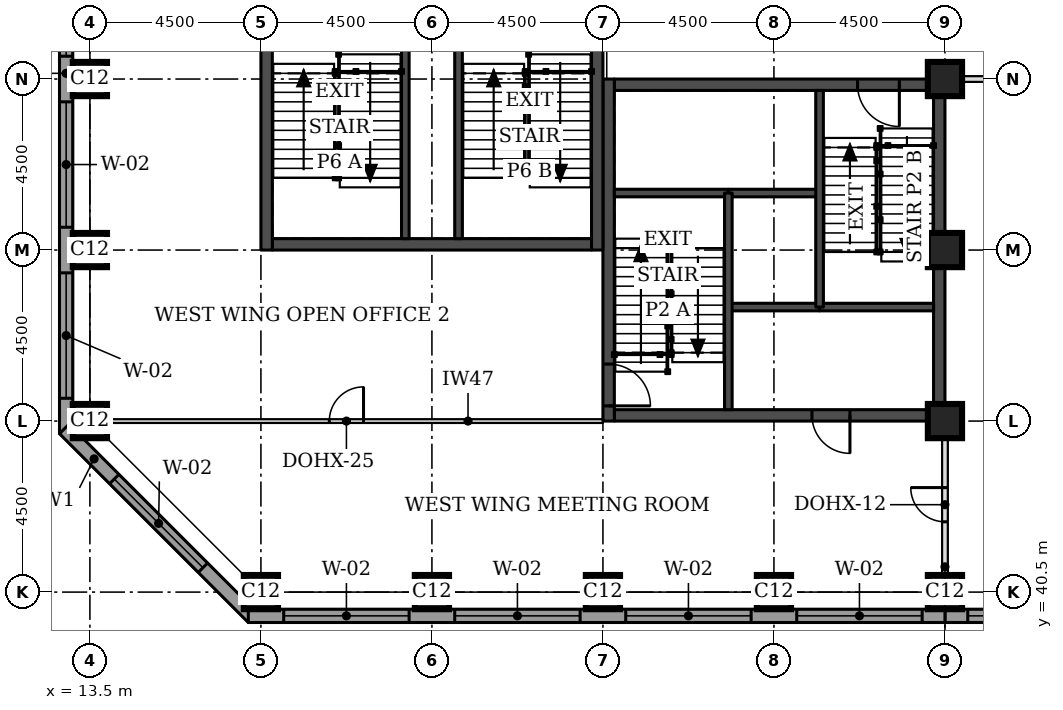
"""IFC4 building model, lengths in metres.
Left out: names, types, materials, properties, quantities, classifications, styles, units other than length and angle.
Written with IfcOpenShell. Run it as: python <this file> out.ifc"""

import sys

from ifc_helpers import new_model, si_unit, direction, frame, frame_2d, origin, origin_2d, place, context, subcontext, project, spatial, rectangle, extrude, element, fill, save


model = new_model("IFC4")
c1 = context("Model", 3, precision=1e-05, world=origin(), true_north=direction((0.0, 1.0)))
c2 = subcontext(c1, "Body", "Model", "MODEL_VIEW")
j1 = project(units=[si_unit("LENGTHUNIT", "METRE"), si_unit("PLANEANGLEUNIT", "RADIAN")], contexts=[c1])
p1 = place(None, origin())
s1 = spatial("IfcSite", under=j1, at=p1, CompositionType="ELEMENT")
p2 = place(p1, origin())
s2 = spatial("IfcBuilding", under=s1, at=p2, CompositionType="ELEMENT")
p3 = place(p2, frame((0.0, 0.0, 256.3)))
s3 = spatial("IfcBuildingStorey", under=s2, at=p3, CompositionType="ELEMENT", Elevation=256.3)
for number, where, z_axis, x_axis in (
    (1, (18.0, 40.5, 0.0), (0.0, 0.0, 1.0), (1.0, 0.0, 0.0)),
    (2, (22.5, 40.5, 0.0), (0.0, 0.0, 1.0), (1.0, 0.0, 0.0)),
    (3, (27.0, 40.5, 0.0), (0.0, 0.0, 1.0), (1.0, 0.0, 0.0)),
    (4, (31.5, 40.5, 0.0), (0.0, 0.0, 1.0), (1.0, 0.0, 0.0)),
    (5, (36.0, 40.5, 0.0), (0.0, 0.0, 1.0), (1.0, 0.0, 0.0)),
    (6, (13.5, 45.0, 0.0), (0.0, 0.0, 1.0), (1.0, 0.0, 0.0)),
    (7, (36.0, 45.0, 0.0), (0.0, 0.0, 1.0), (1.0, 0.0, 0.0)),
    (8, (13.5, 49.5, 0.0), (0.0, 0.0, 1.0), (1.0, 0.0, 0.0)),
    (9, (36.0, 49.5, 0.0), (0.0, 0.0, 1.0), (1.0, 0.0, 0.0)),
    (10, (13.5, 54.0, 0.0), (0.0, 0.0, 1.0), (1.0, 0.0, 0.0)),
    (11, (36.0, 54.0, 0.0), (0.0, 0.0, 1.0), (1.0, 0.0, 0.0)),
):
    element("IfcColumn", number, at=place(p3, frame(where, z_axis=z_axis, x_axis=x_axis)), inside=s3, PredefinedType="COLUMN", context=c2, shape_type="SweptSolid", body=[
        extrude(rectangle(XDim=0.9, YDim=0.9, at=origin_2d()), origin(), (0.0, 0.0, 1.0), 3.7),
    ])
p4 = place(p3, frame((27.3, 45.15, 0.0), z_axis=(0.0, 0.0, 1.0), x_axis=(1.0, 0.0, 0.0)))
e12 = element("IfcWall", 12, at=p4, inside=s3, PredefinedType="SHEAR", context=c2, shape_type="SweptSolid", body=[
    extrude(rectangle(XDim=8.4, YDim=0.3, at=frame_2d((4.2, 0.0))), origin(), (0.0, 0.0, 1.0), 3.7),
])
p5 = place(p4, frame((5.2, 0.0, 0.0)))
e13 = element("IfcOpeningElement", 13, at=p5, cuts=e12, PredefinedType="OPENING", context=c2, shape_type="SweptSolid", body=[
    extrude(rectangle(XDim=1.0, YDim=2.1, at=frame_2d((0.5, 1.05))), frame((0.0, 0.16, 0.0), z_axis=(0.0, -1.0, 0.0), x_axis=(1.0, 0.0, 0.0)), (0.0, 0.0, 1.0), 0.32),
])
p6 = place(p3, frame((27.3, 53.85, 0.0), z_axis=(0.0, 0.0, 1.0), x_axis=(1.0, 0.0, 0.0)))
e14 = element("IfcWall", 14, at=p6, inside=s3, PredefinedType="SHEAR", context=c2, shape_type="SweptSolid", body=[
    extrude(rectangle(XDim=8.4, YDim=0.3, at=frame_2d((4.2, 0.0))), origin(), (0.0, 0.0, 1.0), 3.7),
])
p7 = place(p6, frame((6.4, 0.0, 0.0)))
e15 = element("IfcOpeningElement", 15, at=p7, cuts=e14, PredefinedType="OPENING", context=c2, shape_type="SweptSolid", body=[
    extrude(rectangle(XDim=1.1, YDim=2.1, at=frame_2d((0.55, 1.05))), frame((0.0, 0.16, 0.0), z_axis=(0.0, -1.0, 0.0), x_axis=(1.0, 0.0, 0.0)), (0.0, 0.0, 1.0), 0.32),
])
p8 = place(p3, frame((27.15, 45.0, 0.0), z_axis=(0.0, 0.0, 1.0), x_axis=(0.0, 1.0, 0.0)))
e16 = element("IfcWall", 16, at=p8, inside=s3, PredefinedType="SHEAR", context=c2, shape_type="SweptSolid", body=[
    extrude(rectangle(XDim=9.0, YDim=0.3, at=frame_2d((4.5, 0.0))), origin(), (0.0, 0.0, 1.0), 3.7),
])
p9 = place(p8, frame((0.4, 0.0, 0.0)))
e17 = element("IfcOpeningElement", 17, at=p9, cuts=e16, PredefinedType="OPENING", context=c2, shape_type="SweptSolid", body=[
    extrude(rectangle(XDim=1.1, YDim=2.1, at=frame_2d((0.55, 1.05))), frame((0.0, 0.16, 0.0), z_axis=(0.0, -1.0, 0.0), x_axis=(1.0, 0.0, 0.0)), (0.0, 0.0, 1.0), 0.32),
])
p10 = place(p3, frame((35.85, 45.0, 0.0), z_axis=(0.0, 0.0, 1.0), x_axis=(0.0, 1.0, 0.0)))
e18 = element("IfcWall", 18, at=p10, inside=s3, PredefinedType="SHEAR", context=c2, shape_type="SweptSolid", body=[
    extrude(rectangle(XDim=9.0, YDim=0.3, at=frame_2d((4.5, 0.0))), origin(), (0.0, 0.0, 1.0), 3.7),
])
p11 = place(p3, frame((18.3, 49.65, 0.0), z_axis=(0.0, 0.0, 1.0), x_axis=(1.0, 0.0, 0.0)))
e19 = element("IfcWall", 19, at=p11, inside=s3, PredefinedType="SHEAR", context=c2, shape_type="SweptSolid", body=[
    extrude(rectangle(XDim=8.4, YDim=0.3, at=frame_2d((4.2, 0.0))), origin(), (0.0, 0.0, 1.0), 3.7),
])
p12 = place(p3, frame((18.15, 49.5, 0.0), z_axis=(0.0, 0.0, 1.0), x_axis=(0.0, 1.0, 0.0)))
e20 = element("IfcWall", 20, at=p12, inside=s3, PredefinedType="SHEAR", context=c2, shape_type="SweptSolid", body=[
    extrude(rectangle(XDim=9.0, YDim=0.3, at=frame_2d((4.5, 0.0))), origin(), (0.0, 0.0, 1.0), 3.7),
])
p13 = place(p3, frame((26.85, 49.5, 0.0), z_axis=(0.0, 0.0, 1.0), x_axis=(0.0, 1.0, 0.0)))
e21 = element("IfcWall", 21, at=p13, inside=s3, PredefinedType="SHEAR", context=c2, shape_type="SweptSolid", body=[
    extrude(rectangle(XDim=9.0, YDim=0.3, at=frame_2d((4.5, 0.0))), origin(), (0.0, 0.0, 1.0), 3.7),
])
p14 = place(p13, frame((6.6, 0.0, 0.0)))
e22 = element("IfcOpeningElement", 22, at=p14, cuts=e21, PredefinedType="OPENING", context=c2, shape_type="SweptSolid", body=[
    extrude(rectangle(XDim=1.8, YDim=2.1, at=frame_2d((0.9, 1.05))), frame((0.0, 0.16, 0.0), z_axis=(0.0, -1.0, 0.0), x_axis=(1.0, 0.0, 0.0)), (0.0, 0.0, 1.0), 0.32),
])
p15 = place(p3, frame((36.0, 39.875, 0.0), z_axis=(0.0, 0.0, 1.0), x_axis=(1.0, 0.0, 0.0)))
e23 = element("IfcWall", 23, at=p15, inside=s3, PredefinedType="STANDARD", context=c2, shape_type="SweptSolid", body=[
    extrude(rectangle(XDim=36.331, YDim=0.35, at=frame_2d((18.166, 0.0))), origin(), (0.0, 0.0, 1.0), 3.525),
])
p16 = place(p15, frame((0.6, 0.0, 0.9)))
e24 = element("IfcOpeningElement", 24, at=p16, cuts=e23, PredefinedType="OPENING", context=c2, shape_type="SweptSolid", body=[
    extrude(rectangle(XDim=3.3, YDim=1.9, at=frame_2d((1.65, 0.95))), frame((0.0, 0.185, 0.0), z_axis=(0.0, -1.0, 0.0), x_axis=(1.0, 0.0, 0.0)), (0.0, 0.0, 1.0), 0.37),
])
p17 = place(p15, frame((5.1, 0.0, 0.9)))
e25 = element("IfcOpeningElement", 25, at=p17, cuts=e23, PredefinedType="OPENING", context=c2, shape_type="SweptSolid", body=[
    extrude(rectangle(XDim=3.3, YDim=1.9, at=frame_2d((1.65, 0.95))), frame((0.0, 0.185, 0.0), z_axis=(0.0, -1.0, 0.0), x_axis=(1.0, 0.0, 0.0)), (0.0, 0.0, 1.0), 0.37),
])
p18 = place(p15, frame((9.6, 0.0, 0.9)))
e26 = element("IfcOpeningElement", 26, at=p18, cuts=e23, PredefinedType="OPENING", context=c2, shape_type="SweptSolid", body=[
    extrude(rectangle(XDim=3.3, YDim=1.9, at=frame_2d((1.65, 0.95))), frame((0.0, 0.185, 0.0), z_axis=(0.0, -1.0, 0.0), x_axis=(1.0, 0.0, 0.0)), (0.0, 0.0, 1.0), 0.37),
])
p19 = place(p15, frame((14.1, 0.0, 0.9)))
e27 = element("IfcOpeningElement", 27, at=p19, cuts=e23, PredefinedType="OPENING", context=c2, shape_type="SweptSolid", body=[
    extrude(rectangle(XDim=3.3, YDim=1.9, at=frame_2d((1.65, 0.95))), frame((0.0, 0.185, 0.0), z_axis=(0.0, -1.0, 0.0), x_axis=(1.0, 0.0, 0.0)), (0.0, 0.0, 1.0), 0.37),
])
p20 = place(p15, frame((18.6, 0.0, 0.9)))
e28 = element("IfcOpeningElement", 28, at=p20, cuts=e23, PredefinedType="OPENING", context=c2, shape_type="SweptSolid", body=[
    extrude(rectangle(XDim=3.3, YDim=1.9, at=frame_2d((1.65, 0.95))), frame((0.0, 0.185, 0.0), z_axis=(0.0, -1.0, 0.0), x_axis=(1.0, 0.0, 0.0)), (0.0, 0.0, 1.0), 0.37),
])
p21 = place(p15, frame((23.1, 0.0, 0.9)))
e29 = element("IfcOpeningElement", 29, at=p21, cuts=e23, PredefinedType="OPENING", context=c2, shape_type="SweptSolid", body=[
    extrude(rectangle(XDim=3.3, YDim=1.9, at=frame_2d((1.65, 0.95))), frame((0.0, 0.185, 0.0), z_axis=(0.0, -1.0, 0.0), x_axis=(1.0, 0.0, 0.0)), (0.0, 0.0, 1.0), 0.37),
])
p22 = place(p15, frame((27.6, 0.0, 0.9)))
e30 = element("IfcOpeningElement", 30, at=p22, cuts=e23, PredefinedType="OPENING", context=c2, shape_type="SweptSolid", body=[
    extrude(rectangle(XDim=3.3, YDim=1.9, at=frame_2d((1.65, 0.95))), frame((0.0, 0.185, 0.0), z_axis=(0.0, -1.0, 0.0), x_axis=(1.0, 0.0, 0.0)), (0.0, 0.0, 1.0), 0.37),
])
p23 = place(p15, frame((32.1, 0.0, 0.9)))
e31 = element("IfcOpeningElement", 31, at=p23, cuts=e23, PredefinedType="OPENING", context=c2, shape_type="SweptSolid", body=[
    extrude(rectangle(XDim=3.3, YDim=1.9, at=frame_2d((1.65, 0.95))), frame((0.0, 0.185, 0.0), z_axis=(0.0, -1.0, 0.0), x_axis=(1.0, 0.0, 0.0)), (0.0, 0.0, 1.0), 0.37),
])
p24 = place(p3, frame((12.875, 58.831, 0.0), z_axis=(0.0, 0.0, 1.0), x_axis=(0.0, -1.0, 0.0)))
e32 = element("IfcWall", 32, at=p24, inside=s3, PredefinedType="STANDARD", context=c2, shape_type="SweptSolid", body=[
    extrude(rectangle(XDim=14.163, YDim=0.35, at=frame_2d((7.081, 0.0))), origin(), (0.0, 0.0, 1.0), 3.525),
])
p25 = place(p24, frame((0.931, 0.0, 0.9)))
e33 = element("IfcOpeningElement", 33, at=p25, cuts=e32, PredefinedType="OPENING", context=c2, shape_type="SweptSolid", body=[
    extrude(rectangle(XDim=3.3, YDim=1.9, at=frame_2d((1.65, 0.95))), frame((0.0, 0.185, 0.0), z_axis=(0.0, -1.0, 0.0), x_axis=(1.0, 0.0, 0.0)), (0.0, 0.0, 1.0), 0.37),
])
p26 = place(p24, frame((5.431, 0.0, 0.9)))
e34 = element("IfcOpeningElement", 34, at=p26, cuts=e32, PredefinedType="OPENING", context=c2, shape_type="SweptSolid", body=[
    extrude(rectangle(XDim=3.3, YDim=1.9, at=frame_2d((1.65, 0.95))), frame((0.0, 0.185, 0.0), z_axis=(0.0, -1.0, 0.0), x_axis=(1.0, 0.0, 0.0)), (0.0, 0.0, 1.0), 0.37),
])
p27 = place(p24, frame((9.931, 0.0, 0.9)))
e35 = element("IfcOpeningElement", 35, at=p27, cuts=e32, PredefinedType="OPENING", context=c2, shape_type="SweptSolid", body=[
    extrude(rectangle(XDim=3.3, YDim=1.9, at=frame_2d((1.65, 0.95))), frame((0.0, 0.185, 0.0), z_axis=(0.0, -1.0, 0.0), x_axis=(1.0, 0.0, 0.0)), (0.0, 0.0, 1.0), 0.37),
])
p28 = place(p3, frame((12.824, 44.792, 0.0), z_axis=(0.0, 0.0, 1.0), x_axis=(0.707106781187, -0.707106781187, 0.0)))
e36 = element("IfcWall", 36, at=p28, inside=s3, PredefinedType="STANDARD", context=c2, shape_type="SweptSolid", body=[
    extrude(rectangle(XDim=7.027, YDim=0.35, at=frame_2d((3.513, 0.0))), origin(), (0.0, 0.0, 1.0), 3.525),
])
p29 = place(p28, frame((1.863, 0.0, 0.9)))
e37 = element("IfcOpeningElement", 37, at=p29, cuts=e36, PredefinedType="OPENING", context=c2, shape_type="SweptSolid", body=[
    extrude(rectangle(XDim=3.3, YDim=1.9, at=frame_2d((1.65, 0.95))), frame((0.0, 0.185, 0.0), z_axis=(0.0, -1.0, 0.0), x_axis=(1.0, 0.0, 0.0)), (0.0, 0.0, 1.0), 0.37),
])
p30 = place(p3, frame((17.669, 39.875, 0.0), z_axis=(0.0, 0.0, 1.0), x_axis=(1.0, 0.0, 0.0)))
e38 = element("IfcWall", 38, at=p30, inside=s3, PredefinedType="STANDARD", context=c2, shape_type="SweptSolid", body=[
    extrude(rectangle(XDim=18.331, YDim=0.35, at=frame_2d((9.166, 0.0))), origin(), (0.0, 0.0, 1.0), 3.525),
])
p31 = place(p30, frame((0.931, 0.0, 0.9)))
e39 = element("IfcOpeningElement", 39, at=p31, cuts=e38, PredefinedType="OPENING", context=c2, shape_type="SweptSolid", body=[
    extrude(rectangle(XDim=3.3, YDim=1.9, at=frame_2d((1.65, 0.95))), frame((0.0, 0.185, 0.0), z_axis=(0.0, -1.0, 0.0), x_axis=(1.0, 0.0, 0.0)), (0.0, 0.0, 1.0), 0.37),
])
p32 = place(p30, frame((5.431, 0.0, 0.9)))
e40 = element("IfcOpeningElement", 40, at=p32, cuts=e38, PredefinedType="OPENING", context=c2, shape_type="SweptSolid", body=[
    extrude(rectangle(XDim=3.3, YDim=1.9, at=frame_2d((1.65, 0.95))), frame((0.0, 0.185, 0.0), z_axis=(0.0, -1.0, 0.0), x_axis=(1.0, 0.0, 0.0)), (0.0, 0.0, 1.0), 0.37),
])
p33 = place(p30, frame((9.931, 0.0, 0.9)))
e41 = element("IfcOpeningElement", 41, at=p33, cuts=e38, PredefinedType="OPENING", context=c2, shape_type="SweptSolid", body=[
    extrude(rectangle(XDim=3.3, YDim=1.9, at=frame_2d((1.65, 0.95))), frame((0.0, 0.185, 0.0), z_axis=(0.0, -1.0, 0.0), x_axis=(1.0, 0.0, 0.0)), (0.0, 0.0, 1.0), 0.37),
])
p34 = place(p30, frame((14.431, 0.0, 0.9)))
e42 = element("IfcOpeningElement", 42, at=p34, cuts=e38, PredefinedType="OPENING", context=c2, shape_type="SweptSolid", body=[
    extrude(rectangle(XDim=3.3, YDim=1.9, at=frame_2d((1.65, 0.95))), frame((0.0, 0.185, 0.0), z_axis=(0.0, -1.0, 0.0), x_axis=(1.0, 0.0, 0.0)), (0.0, 0.0, 1.0), 0.37),
])
p35 = place(p3, frame((36.45, 54.0, 0.0), z_axis=(0.0, 0.0, 1.0), x_axis=(1.0, 0.0, 0.0)))
e43 = element("IfcWall", 43, at=p35, inside=s3, PredefinedType="PARTITIONING", context=c2, shape_type="SweptSolid", body=[
    extrude(rectangle(XDim=5.625, YDim=0.15, at=frame_2d((2.812, 0.0))), origin(), (0.0, 0.0, 1.0), 3.55),
])
p36 = place(p3, frame((36.0, 40.95, 0.0), z_axis=(0.0, 0.0, 1.0), x_axis=(0.0, 1.0, 0.0)))
e44 = element("IfcWall", 44, at=p36, inside=s3, PredefinedType="PARTITIONING", context=c2, shape_type="SweptSolid", body=[
    extrude(rectangle(XDim=3.63, YDim=0.15, at=frame_2d((1.815, 0.0))), origin(), (0.0, 0.0, 1.0), 2.8),
])
p37 = place(p36, frame((1.4, 0.0, 0.0)))
e45 = element("IfcOpeningElement", 45, at=p37, cuts=e44, PredefinedType="OPENING", context=c2, shape_type="SweptSolid", body=[
    extrude(rectangle(XDim=0.9, YDim=2.1, at=frame_2d((0.45, 1.05))), frame((0.0, 0.085, 0.0), z_axis=(0.0, -1.0, 0.0), x_axis=(1.0, 0.0, 0.0)), (0.0, 0.0, 1.0), 0.17),
])
p38 = place(p3, frame((13.5, 45.0, 0.0), z_axis=(0.0, 0.0, 1.0), x_axis=(1.0, 0.0, 0.0)))
e46 = element("IfcWall", 46, at=p38, inside=s3, PredefinedType="PARTITIONING", context=c2, shape_type="SweptSolid", body=[
    extrude(rectangle(XDim=13.5, YDim=0.1, at=frame_2d((6.75, 0.0))), origin(), (0.0, 0.0, 1.0), 2.55),
])
p39 = place(p38, frame((6.3, 0.0, 0.0)))
e47 = element("IfcOpeningElement", 47, at=p39, cuts=e46, PredefinedType="OPENING", context=c2, shape_type="SweptSolid", body=[
    extrude(rectangle(XDim=0.9, YDim=2.1, at=frame_2d((0.45, 1.05))), frame((0.0, 0.06, 0.0), z_axis=(0.0, -1.0, 0.0), x_axis=(1.0, 0.0, 0.0)), (0.0, 0.0, 1.0), 0.12),
])
p40 = place(p3, frame((30.3, 48.0, 0.0), z_axis=(0.0, 0.0, 1.0), x_axis=(1.0, 0.0, 0.0)))
e48 = element("IfcWall", 48, at=p40, inside=s3, PredefinedType="SOLIDWALL", context=c2, shape_type="SweptSolid", body=[
    extrude(rectangle(XDim=2.4, YDim=0.2, at=frame_2d((1.2, 0.0))), origin(), (0.0, 0.0, 1.0), 3.55),
])
p41 = place(p3, frame((32.7, 48.0, 0.0), z_axis=(0.0, 0.0, 1.0), x_axis=(1.0, 0.0, 0.0)))
e49 = element("IfcWall", 49, at=p41, inside=s3, PredefinedType="SOLIDWALL", context=c2, shape_type="SweptSolid", body=[
    extrude(rectangle(XDim=3.0, YDim=0.2, at=frame_2d((1.5, 0.0))), origin(), (0.0, 0.0, 1.0), 3.55),
])
p42 = place(p3, frame((30.3, 51.0, 0.0), z_axis=(0.0, 0.0, 1.0), x_axis=(1.0, 0.0, 0.0)))
e50 = element("IfcWall", 50, at=p42, inside=s3, PredefinedType="SOLIDWALL", context=c2, shape_type="SweptSolid", body=[
    extrude(rectangle(XDim=2.4, YDim=0.2, at=frame_2d((1.2, 0.0))), origin(), (0.0, 0.0, 1.0), 3.7),
])
p43 = place(p3, frame((27.3, 51.0, 0.0), z_axis=(0.0, 0.0, 1.0), x_axis=(1.0, 0.0, 0.0)))
e51 = element("IfcWall", 51, at=p43, inside=s3, PredefinedType="SOLIDWALL", context=c2, shape_type="SweptSolid", body=[
    extrude(rectangle(XDim=3.0, YDim=0.2, at=frame_2d((1.5, 0.0))), origin(), (0.0, 0.0, 1.0), 3.55),
])
for number, where, z_axis, x_axis in (
    (52, (30.3, 45.3, 0.0), (0.0, 0.0, 1.0), (0.0, 1.0, 0.0)),
    (53, (32.7, 48.0, 0.0), (0.0, 0.0, 1.0), (0.0, 1.0, 0.0)),
):
    element("IfcWall", number, at=place(p3, frame(where, z_axis=z_axis, x_axis=x_axis)), inside=s3, PredefinedType="SOLIDWALL", context=c2, shape_type="SweptSolid", body=[
        extrude(rectangle(XDim=5.7, YDim=0.2, at=frame_2d((2.85, 0.0))), origin(), (0.0, 0.0, 1.0), 3.55),
    ])
for number, where, z_axis, x_axis in (
    (54, (21.8, 49.8, 0.0), (0.0, 0.0, 1.0), (0.0, 1.0, 0.0)),
    (55, (23.2, 49.8, 0.0), (0.0, 0.0, 1.0), (0.0, 1.0, 0.0)),
):
    element("IfcWall", number, at=place(p3, frame(where, z_axis=z_axis, x_axis=x_axis)), inside=s3, PredefinedType="SOLIDWALL", context=c2, shape_type="SweptSolid", body=[
        extrude(rectangle(XDim=6.05, YDim=0.2, at=frame_2d((3.025, 0.0))), origin(), (0.0, 0.0, 1.0), 3.55),
    ])
p44 = place(p16, origin())
e56 = element("IfcWindow", 56, at=p44, inside=s3, PartitioningType="SINGLE_PANEL", PredefinedType="WINDOW", context=c2, shape_type="SweptSolid", body=[
    extrude(rectangle(XDim=3.3, YDim=1.9, at=frame_2d((1.65, 0.95))), frame((0.0, 0.085, 0.0), z_axis=(0.0, -1.0, 0.0), x_axis=(1.0, 0.0, 0.0)), (0.0, 0.0, 1.0), 0.06),
])
fill(e24, e56)
p45 = place(p25, origin())
e57 = element("IfcWindow", 57, at=p45, inside=s3, PartitioningType="SINGLE_PANEL", PredefinedType="WINDOW", context=c2, shape_type="SweptSolid", body=[
    extrude(rectangle(XDim=3.3, YDim=1.9, at=frame_2d((1.65, 0.95))), frame((0.0, 0.085, 0.0), z_axis=(0.0, -1.0, 0.0), x_axis=(1.0, 0.0, 0.0)), (0.0, 0.0, 1.0), 0.06),
])
fill(e33, e57)
p46 = place(p26, origin())
e58 = element("IfcWindow", 58, at=p46, inside=s3, PartitioningType="SINGLE_PANEL", PredefinedType="WINDOW", context=c2, shape_type="SweptSolid", body=[
    extrude(rectangle(XDim=3.3, YDim=1.9, at=frame_2d((1.65, 0.95))), frame((0.0, 0.085, 0.0), z_axis=(0.0, -1.0, 0.0), x_axis=(1.0, 0.0, 0.0)), (0.0, 0.0, 1.0), 0.06),
])
fill(e34, e58)
p47 = place(p27, origin())
e59 = element("IfcWindow", 59, at=p47, inside=s3, PartitioningType="SINGLE_PANEL", PredefinedType="WINDOW", context=c2, shape_type="SweptSolid", body=[
    extrude(rectangle(XDim=3.3, YDim=1.9, at=frame_2d((1.65, 0.95))), frame((0.0, 0.085, 0.0), z_axis=(0.0, -1.0, 0.0), x_axis=(1.0, 0.0, 0.0)), (0.0, 0.0, 1.0), 0.06),
])
fill(e35, e59)
p48 = place(p29, origin())
e60 = element("IfcWindow", 60, at=p48, inside=s3, PartitioningType="SINGLE_PANEL", PredefinedType="WINDOW", context=c2, shape_type="SweptSolid", body=[
    extrude(rectangle(XDim=3.3, YDim=1.9, at=frame_2d((1.65, 0.95))), frame((0.0, 0.085, 0.0), z_axis=(0.0, -1.0, 0.0), x_axis=(1.0, 0.0, 0.0)), (0.0, 0.0, 1.0), 0.06),
])
fill(e37, e60)
p49 = place(p31, origin())
e61 = element("IfcWindow", 61, at=p49, inside=s3, PartitioningType="SINGLE_PANEL", PredefinedType="WINDOW", context=c2, shape_type="SweptSolid", body=[
    extrude(rectangle(XDim=3.3, YDim=1.9, at=frame_2d((1.65, 0.95))), frame((0.0, 0.085, 0.0), z_axis=(0.0, -1.0, 0.0), x_axis=(1.0, 0.0, 0.0)), (0.0, 0.0, 1.0), 0.06),
])
fill(e39, e61)
p50 = place(p32, origin())
e62 = element("IfcWindow", 62, at=p50, inside=s3, PartitioningType="SINGLE_PANEL", PredefinedType="WINDOW", context=c2, shape_type="SweptSolid", body=[
    extrude(rectangle(XDim=3.3, YDim=1.9, at=frame_2d((1.65, 0.95))), frame((0.0, 0.085, 0.0), z_axis=(0.0, -1.0, 0.0), x_axis=(1.0, 0.0, 0.0)), (0.0, 0.0, 1.0), 0.06),
])
fill(e40, e62)
p51 = place(p33, origin())
e63 = element("IfcWindow", 63, at=p51, inside=s3, PartitioningType="SINGLE_PANEL", PredefinedType="WINDOW", context=c2, shape_type="SweptSolid", body=[
    extrude(rectangle(XDim=3.3, YDim=1.9, at=frame_2d((1.65, 0.95))), frame((0.0, 0.085, 0.0), z_axis=(0.0, -1.0, 0.0), x_axis=(1.0, 0.0, 0.0)), (0.0, 0.0, 1.0), 0.06),
])
fill(e41, e63)
p52 = place(p34, origin())
e64 = element("IfcWindow", 64, at=p52, inside=s3, PartitioningType="SINGLE_PANEL", PredefinedType="WINDOW", context=c2, shape_type="SweptSolid", body=[
    extrude(rectangle(XDim=3.3, YDim=1.9, at=frame_2d((1.65, 0.95))), frame((0.0, 0.085, 0.0), z_axis=(0.0, -1.0, 0.0), x_axis=(1.0, 0.0, 0.0)), (0.0, 0.0, 1.0), 0.06),
])
fill(e42, e64)
p53 = place(p37, origin())
e65 = element("IfcDoor", 65, at=p53, inside=s3, OperationType="SINGLE_SWING_RIGHT", PredefinedType="DOOR", context=c2, shape_type="SweptSolid", body=[
    extrude(rectangle(XDim=0.9, YDim=2.1, at=frame_2d((0.45, 1.05))), frame((0.0, 0.025, 0.0), z_axis=(0.0, -1.0, 0.0), x_axis=(1.0, 0.0, 0.0)), (0.0, 0.0, 1.0), 0.05),
])
fill(e45, e65)
p54 = place(p39, origin())
e66 = element("IfcDoor", 66, at=p54, inside=s3, OperationType="SINGLE_SWING_RIGHT", PredefinedType="DOOR", context=c2, shape_type="SweptSolid", body=[
    extrude(rectangle(XDim=0.9, YDim=2.1, at=frame_2d((0.45, 1.05))), frame((0.0, 0.025, 0.0), z_axis=(0.0, -1.0, 0.0), x_axis=(1.0, 0.0, 0.0)), (0.0, 0.0, 1.0), 0.05),
])
fill(e47, e66)
p55 = place(p9, frame((1.1, 0.0, 0.0), z_axis=(0.0, 0.0, 1.0), x_axis=(-1.0, 0.0, 0.0)))
e67 = element("IfcDoor", 67, at=p55, inside=s3, OperationType="SINGLE_SWING_RIGHT", PredefinedType="DOOR", context=c2, shape_type="SweptSolid", body=[
    extrude(rectangle(XDim=1.1, YDim=2.1, at=frame_2d((0.55, 1.05))), frame((0.0, 0.025, 0.0), z_axis=(0.0, -1.0, 0.0), x_axis=(1.0, 0.0, 0.0)), (0.0, 0.0, 1.0), 0.05),
])
fill(e17, e67)
p56 = place(p7, frame((1.1, 0.0, 0.0), z_axis=(0.0, 0.0, 1.0), x_axis=(-1.0, 0.0, 0.0)))
e68 = element("IfcDoor", 68, at=p56, inside=s3, OperationType="SINGLE_SWING_LEFT", PredefinedType="DOOR", context=c2, shape_type="SweptSolid", body=[
    extrude(rectangle(XDim=1.1, YDim=2.1, at=frame_2d((0.55, 1.05))), frame((0.0, 0.025, 0.0), z_axis=(0.0, -1.0, 0.0), x_axis=(1.0, 0.0, 0.0)), (0.0, 0.0, 1.0), 0.05),
])
fill(e15, e68)
p57 = place(p5, frame((1.0, 0.0, 0.0), z_axis=(0.0, 0.0, 1.0), x_axis=(-1.0, 0.0, 0.0)))
e69 = element("IfcDoor", 69, at=p57, inside=s3, OperationType="SINGLE_SWING_LEFT", PredefinedType="DOOR", context=c2, shape_type="SweptSolid", body=[
    extrude(rectangle(XDim=1.0, YDim=2.1, at=frame_2d((0.5, 1.05))), frame((0.0, 0.025, 0.0), z_axis=(0.0, -1.0, 0.0), x_axis=(1.0, 0.0, 0.0)), (0.0, 0.0, 1.0), 0.05),
])
fill(e13, e69)
save(model, sys.argv[1])
